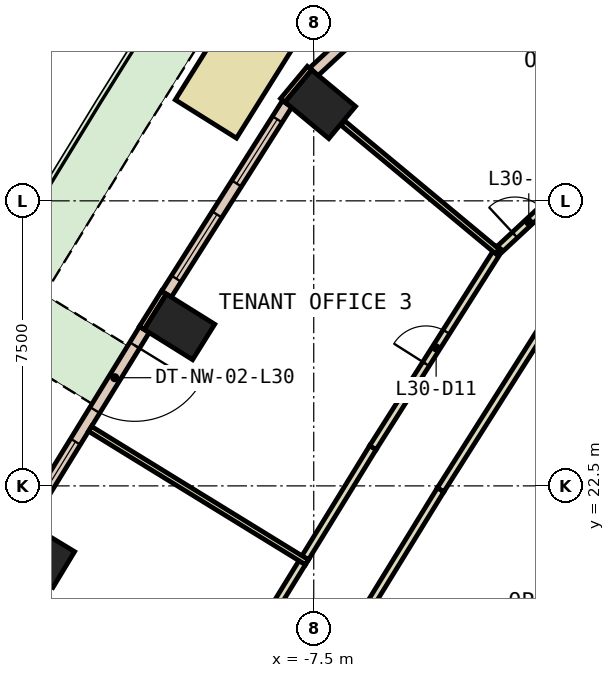
"""IFC4 building model, lengths in metres.
Left out: names, types, materials, properties, quantities, classifications, styles, units other than length and angle.
Written with IfcOpenShell. Run it as: python <this file> out.ifc"""

import sys

from ifc_helpers import new_model, si_unit, direction, frame, frame_2d, origin, origin_2d, place, context, subcontext, project, spatial, rectangle, extrude, element, fill, save


model = new_model("IFC4")
c1 = context("Model", 3, precision=1e-05, world=origin(), true_north=direction((0.0, 1.0)))
c2 = subcontext(c1, "Body", "Model", "MODEL_VIEW")
j1 = project(units=[si_unit("LENGTHUNIT", "METRE"), si_unit("PLANEANGLEUNIT", "RADIAN")], contexts=[c1])
p1 = place(None, origin())
s1 = spatial("IfcSite", under=j1, at=p1, CompositionType="ELEMENT")
p2 = place(p1, origin())
s2 = spatial("IfcBuilding", under=s1, at=p2, CompositionType="ELEMENT")
p3 = place(p2, frame((0.0, 0.0, 138.2)))
s3 = spatial("IfcBuildingStorey", under=s2, at=p3, CompositionType="ELEMENT", Elevation=138.2)
for number, where, z_axis, x_axis in (
    (1, (-7.329, 32.541, 0.0), (0.0, 0.0, 1.0), (0.639, 0.769, 0.0)),
    (2, (-11.033, 26.684, 0.0), (0.0, 0.0, 1.0), (0.53, 0.848, 0.0)),
    (3, (-14.719, 20.688, 0.0), (0.0, 0.0, 1.0), (0.518, 0.855, 0.0)),
):
    element("IfcColumn", number, at=place(p3, frame(where, z_axis=z_axis, x_axis=x_axis)), inside=s3, PredefinedType="COLUMN", context=c2, shape_type="SweptSolid", body=[
        extrude(rectangle(XDim=1.1, YDim=1.5, at=origin_2d()), origin(), (0.0, 0.0, 1.0), 3.8),
    ])
p4 = place(p3, frame((-7.612, 33.491, 0.0), z_axis=(0.0, 0.0, 1.0), x_axis=(-0.639070205934, -0.769148406933, 0.0)))
e4 = element("IfcWall", 4, at=p4, inside=s3, PredefinedType="STANDARD", context=c2, shape_type="SweptSolid", body=[
    extrude(rectangle(XDim=1.1, YDim=0.15, at=frame_2d((0.55, 0.0))), origin(), (0.0, 0.0, 1.0), 3.8),
])
p5 = place(p3, frame((-11.441, 27.588, 0.0), z_axis=(0.0, 0.0, 1.0), x_axis=(-0.52997899071, -0.848010771987, 0.0)))
e5 = element("IfcWall", 5, at=p5, inside=s3, PredefinedType="STANDARD", context=c2, shape_type="SweptSolid", body=[
    extrude(rectangle(XDim=1.1, YDim=0.15, at=frame_2d((0.55, 0.0))), origin(), (0.0, 0.0, 1.0), 3.8),
])
p6 = place(p3, frame((-4.91, 35.805, 0.0), z_axis=(0.0, 0.0, 1.0), x_axis=(-0.732121882671, -0.681173655475, 0.0)))
e6 = element("IfcWall", 6, at=p6, inside=s3, PredefinedType="STANDARD", context=c2, shape_type="SweptSolid", body=[
    extrude(rectangle(XDim=3.536, YDim=0.3, at=frame_2d((1.768, 0.0))), origin(), (0.0, 0.0, 1.0), 3.8),
])
p7 = place(p6, frame((1.068, 0.0, 0.9)))
e7 = element("IfcOpeningElement", 7, at=p7, cuts=e6, PredefinedType="OPENING", context=c2, shape_type="SweptSolid", body=[
    extrude(rectangle(XDim=1.4, YDim=2.6, at=frame_2d((0.7, 1.3))), frame((0.0, 0.16, 0.0), z_axis=(0.0, -1.0, 0.0), x_axis=(1.0, 0.0, 0.0)), (0.0, 0.0, 1.0), 0.32),
])
p8 = place(p3, frame((-8.201, 32.552, 0.0), z_axis=(0.0, 0.0, 1.0), x_axis=(-0.535403761464, -0.844596242124, 0.0)))
e8 = element("IfcWall", 8, at=p8, inside=s3, PredefinedType="STANDARD", context=c2, shape_type="SweptSolid", body=[
    extrude(rectangle(XDim=5.928, YDim=0.3, at=frame_2d((2.964, 0.0))), origin(), (0.0, 0.0, 1.0), 3.8),
])
p9 = place(p8, frame((0.482, 0.0, 0.9)))
e9 = element("IfcOpeningElement", 9, at=p9, cuts=e8, PredefinedType="OPENING", context=c2, shape_type="SweptSolid", body=[
    extrude(rectangle(XDim=2.0, YDim=2.6, at=frame_2d((1.0, 1.3))), frame((0.0, 0.16, 0.0), z_axis=(0.0, -1.0, 0.0), x_axis=(1.0, 0.0, 0.0)), (0.0, 0.0, 1.0), 0.32),
])
p10 = place(p8, frame((3.446, 0.0, 0.9)))
e10 = element("IfcOpeningElement", 10, at=p10, cuts=e8, PredefinedType="OPENING", context=c2, shape_type="SweptSolid", body=[
    extrude(rectangle(XDim=2.0, YDim=2.6, at=frame_2d((1.0, 1.3))), frame((0.0, 0.16, 0.0), z_axis=(0.0, -1.0, 0.0), x_axis=(1.0, 0.0, 0.0)), (0.0, 0.0, 1.0), 0.32),
])
p11 = place(p3, frame((-11.956, 26.614, 0.0), z_axis=(0.0, 0.0, 1.0), x_axis=(-0.523719731127, -0.851890628677, 0.0)))
e11 = element("IfcWall", 11, at=p11, inside=s3, PredefinedType="STANDARD", context=c2, shape_type="SweptSolid", body=[
    extrude(rectangle(XDim=5.952, YDim=0.3, at=frame_2d((2.976, 0.0))), origin(), (0.0, 0.0, 1.0), 3.8),
])
p12 = place(p11, frame((0.488, 0.0, 0.0)))
e12 = element("IfcOpeningElement", 12, at=p12, cuts=e11, PredefinedType="OPENING", context=c2, shape_type="SweptSolid", body=[
    extrude(rectangle(XDim=2.0, YDim=2.4, at=frame_2d((1.0, 1.2))), frame((0.0, 0.16, 0.0), z_axis=(0.0, -1.0, 0.0), x_axis=(1.0, 0.0, 0.0)), (0.0, 0.0, 1.0), 0.32),
])
p13 = place(p11, frame((3.464, 0.0, 0.9)))
e13 = element("IfcOpeningElement", 13, at=p13, cuts=e11, PredefinedType="OPENING", context=c2, shape_type="SweptSolid", body=[
    extrude(rectangle(XDim=2.0, YDim=2.6, at=frame_2d((1.0, 1.3))), frame((0.0, 0.16, 0.0), z_axis=(0.0, -1.0, 0.0), x_axis=(1.0, 0.0, 0.0)), (0.0, 0.0, 1.0), 0.32),
])
p14 = place(p3, frame((-7.571, 36.575, 0.0), z_axis=(0.0, 0.0, 1.0), x_axis=(-0.530520609595, -0.847672037285, 0.0)))
e14 = element("IfcWall", 14, at=p14, inside=s3, PredefinedType="STANDARD", context=c2, shape_type="SweptSolid", body=[
    extrude(rectangle(XDim=5.215, YDim=1.9, at=frame_2d((2.608, 0.0))), origin(), (0.0, 0.0, 1.0), 0.8),
])
p15 = place(p3, frame((-0.988, 27.401, 0.0), z_axis=(0.0, 0.0, 1.0), x_axis=(-0.535496886312, -0.844537201519, 0.0)))
e15 = element("IfcWall", 15, at=p15, inside=s3, PredefinedType="PARTITIONING", context=c2, shape_type="SweptSolid", body=[
    extrude(rectangle(XDim=5.927, YDim=0.2, at=frame_2d((2.964, 0.0))), origin(), (0.0, 0.0, 1.0), 3.8),
])
p16 = place(p3, frame((-4.162, 22.395, 0.0), z_axis=(0.0, 0.0, 1.0), x_axis=(-0.523625371849, -0.851948631055, 0.0)))
e16 = element("IfcWall", 16, at=p16, inside=s3, PredefinedType="PARTITIONING", context=c2, shape_type="SweptSolid", body=[
    extrude(rectangle(XDim=6.927, YDim=0.2, at=frame_2d((3.463, 0.0))), origin(), (0.0, 0.0, 1.0), 3.8),
])
p17 = place(p3, frame((-2.597, 28.738, 0.0), z_axis=(0.0, 0.0, 1.0), x_axis=(0.73206471367, 0.681235095249, 0.0)))
e17 = element("IfcWall", 17, at=p17, inside=s3, PredefinedType="PARTITIONING", context=c2, shape_type="SweptSolid", body=[
    extrude(rectangle(XDim=2.065, YDim=0.2, at=frame_2d((1.033, 0.0))), origin(), (0.0, 0.0, 1.0), 3.8),
])
p18 = place(p17, frame((0.532, 0.0, 0.0)))
e18 = element("IfcOpeningElement", 18, at=p18, cuts=e17, PredefinedType="OPENING", context=c2, shape_type="SweptSolid", body=[
    extrude(rectangle(XDim=1.0, YDim=2.1, at=frame_2d((0.5, 1.05))), frame((0.0, 0.11, 0.0), z_axis=(0.0, -1.0, 0.0), x_axis=(1.0, 0.0, 0.0)), (0.0, 0.0, 1.0), 0.22),
])
p19 = place(p3, frame((-7.725, 20.608, 0.0), z_axis=(0.0, 0.0, 1.0), x_axis=(0.523645038298, 0.851936543333, 0.0)))
e19 = element("IfcWall", 19, at=p19, inside=s3, PredefinedType="PARTITIONING", context=c2, shape_type="SweptSolid", body=[
    extrude(rectangle(XDim=3.403, YDim=0.2, at=frame_2d((1.702, 0.0))), origin(), (0.0, 0.0, 1.0), 3.8),
])
p20 = place(p3, frame((-5.943, 23.507, 0.0), z_axis=(0.0, 0.0, 1.0), x_axis=(0.535529721247, 0.844516380931, 0.0)))
e20 = element("IfcWall", 20, at=p20, inside=s3, PredefinedType="PARTITIONING", context=c2, shape_type="SweptSolid", body=[
    extrude(rectangle(XDim=6.213, YDim=0.2, at=frame_2d((3.106, 0.0))), origin(), (0.0, 0.0, 1.0), 3.8),
])
p21 = place(p20, frame((2.607, 0.0, 0.0)))
e21 = element("IfcOpeningElement", 21, at=p21, cuts=e20, PredefinedType="OPENING", context=c2, shape_type="SweptSolid", body=[
    extrude(rectangle(XDim=1.0, YDim=2.1, at=frame_2d((0.5, 1.05))), frame((0.0, 0.11, 0.0), z_axis=(0.0, -1.0, 0.0), x_axis=(1.0, 0.0, 0.0)), (0.0, 0.0, 1.0), 0.22),
])
p22 = place(p3, frame((-9.586, 17.581, 0.0), z_axis=(0.0, 0.0, 1.0), x_axis=(0.523757261565, 0.851867554822, 0.0)))
e22 = element("IfcWall", 22, at=p22, inside=s3, PredefinedType="PARTITIONING", context=c2, shape_type="SweptSolid", body=[
    extrude(rectangle(XDim=3.404, YDim=0.2, at=frame_2d((1.702, 0.0))), origin(), (0.0, 0.0, 1.0), 3.8),
])
p23 = place(p3, frame((-2.67, 28.67, 0.0), z_axis=(0.0, 0.0, 1.0), x_axis=(-0.769162789992, 0.639052894909, 0.0)))
e23 = element("IfcWall", 23, at=p23, inside=s3, PredefinedType="PARTITIONING", context=c2, shape_type="SweptSolid", body=[
    extrude(rectangle(XDim=5.288, YDim=0.15, at=frame_2d((2.644, 0.0))), origin(), (0.0, 0.0, 1.0), 3.8),
])
p24 = place(p3, frame((-7.679, 20.492, 0.0), z_axis=(0.0, 0.0, 1.0), x_axis=(-0.851897179877, 0.523709074695, 0.0)))
e24 = element("IfcWall", 24, at=p24, inside=s3, PredefinedType="PARTITIONING", context=c2, shape_type="SweptSolid", body=[
    extrude(rectangle(XDim=6.7, YDim=0.15, at=frame_2d((3.35, 0.0))), origin(), (0.0, 0.0, 1.0), 3.8),
])
p25 = place(p9, origin())
e25 = element("IfcWindow", 25, at=p25, inside=s3, PartitioningType="SINGLE_PANEL", PredefinedType="WINDOW", context=c2, shape_type="SweptSolid", body=[
    extrude(rectangle(XDim=2.0, YDim=2.6, at=frame_2d((1.0, 1.3))), frame((0.0, 0.03, 0.0), z_axis=(0.0, -1.0, 0.0), x_axis=(1.0, 0.0, 0.0)), (0.0, 0.0, 1.0), 0.06),
])
fill(e9, e25)
p26 = place(p10, origin())
e26 = element("IfcWindow", 26, at=p26, inside=s3, PartitioningType="SINGLE_PANEL", PredefinedType="WINDOW", context=c2, shape_type="SweptSolid", body=[
    extrude(rectangle(XDim=2.0, YDim=2.6, at=frame_2d((1.0, 1.3))), frame((0.0, 0.03, 0.0), z_axis=(0.0, -1.0, 0.0), x_axis=(1.0, 0.0, 0.0)), (0.0, 0.0, 1.0), 0.06),
])
fill(e10, e26)
p27 = place(p12, origin())
e27 = element("IfcDoor", 27, at=p27, inside=s3, OperationType="SLIDING_TO_LEFT", PredefinedType="DOOR", context=c2, shape_type="SweptSolid", body=[
    extrude(rectangle(XDim=2.0, YDim=2.4, at=frame_2d((1.0, 1.2))), frame((0.0, 0.025, 0.0), z_axis=(0.0, -1.0, 0.0), x_axis=(1.0, 0.0, 0.0)), (0.0, 0.0, 1.0), 0.05),
])
fill(e12, e27)
p28 = place(p13, origin())
e28 = element("IfcWindow", 28, at=p28, inside=s3, PartitioningType="SINGLE_PANEL", PredefinedType="WINDOW", context=c2, shape_type="SweptSolid", body=[
    extrude(rectangle(XDim=2.0, YDim=2.6, at=frame_2d((1.0, 1.3))), frame((0.0, 0.03, 0.0), z_axis=(0.0, -1.0, 0.0), x_axis=(1.0, 0.0, 0.0)), (0.0, 0.0, 1.0), 0.06),
])
fill(e13, e28)
p29 = place(p18, origin())
e29 = element("IfcDoor", 29, at=p29, inside=s3, OperationType="SINGLE_SWING_LEFT", PredefinedType="DOOR", context=c2, shape_type="SweptSolid", body=[
    extrude(rectangle(XDim=1.0, YDim=2.1, at=frame_2d((0.5, 1.05))), frame((0.0, 0.025, 0.0), z_axis=(0.0, -1.0, 0.0), x_axis=(1.0, 0.0, 0.0)), (0.0, 0.0, 1.0), 0.05),
])
fill(e18, e29)
p30 = place(p21, origin())
e30 = element("IfcDoor", 30, at=p30, inside=s3, OperationType="SINGLE_SWING_LEFT", PredefinedType="DOOR", context=c2, shape_type="SweptSolid", body=[
    extrude(rectangle(XDim=1.0, YDim=2.1, at=frame_2d((0.5, 1.05))), frame((0.0, 0.025, 0.0), z_axis=(0.0, -1.0, 0.0), x_axis=(1.0, 0.0, 0.0)), (0.0, 0.0, 1.0), 0.05),
])
fill(e21, e30)
save(model, sys.argv[1])
